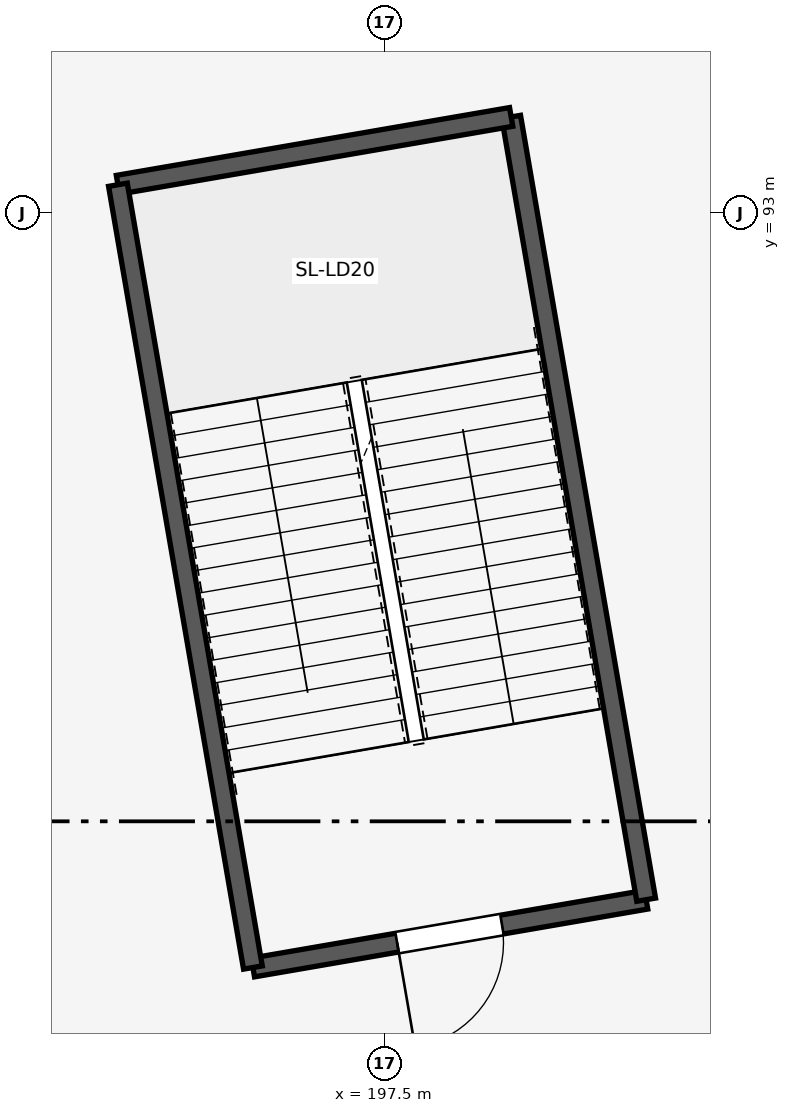
"""IFC4 building model, lengths in metres.
Left out: names, types, materials, properties, quantities, classifications, styles, units other than length and angle.
Written with IfcOpenShell. Run it as: python <this file> out.ifc"""

import sys

from ifc_helpers import new_model, si_unit, direction, frame, frame_2d, origin, place, context, subcontext, project, spatial, rectangle, extrude, element, fill, save


model = new_model("IFC4")
c1 = context("Model", 3, precision=1e-05, world=origin(), true_north=direction((0.0, 1.0)))
c2 = subcontext(c1, "Body", "Model", "MODEL_VIEW")
j1 = project(units=[si_unit("LENGTHUNIT", "METRE"), si_unit("PLANEANGLEUNIT", "RADIAN")], contexts=[c1])
p1 = place(None, origin())
s1 = spatial("IfcSite", under=j1, at=p1, CompositionType="ELEMENT")
p2 = place(p1, origin())
s2 = spatial("IfcBuilding", under=s1, at=p2, CompositionType="ELEMENT")
p3 = place(p2, origin())
s3 = spatial("IfcBuildingStorey", under=s2, at=p3, CompositionType="ELEMENT", Elevation=0.0)
p4 = place(p3, frame((195.762, 83.077, 0.0), z_axis=(0.0, 0.0, 1.0), x_axis=(0.985457162135, 0.16992404655, 0.0)))
e1 = element("IfcWall", 1, at=p4, inside=s3, PredefinedType="SHEAR", context=c2, shape_type="SweptSolid", body=[
    extrude(rectangle(XDim=5.25, YDim=0.25, at=frame_2d((2.625, 0.0))), origin(), (0.0, 0.0, 1.0), 4.94),
])
p5 = place(p4, frame((1.925, 0.0, 0.0)))
e2 = element("IfcOpeningElement", 2, at=p5, cuts=e1, PredefinedType="OPENING", context=c2, shape_type="SweptSolid", body=[
    extrude(rectangle(XDim=1.4, YDim=2.2, at=frame_2d((0.7, 1.1))), frame((0.0, 0.135, 0.0), z_axis=(0.0, -1.0, 0.0), x_axis=(1.0, 0.0, 0.0)), (0.0, 0.0, 1.0), 0.27),
])
p6 = place(p3, frame((200.936, 83.969, 0.0), z_axis=(0.0, 0.0, 1.0), x_axis=(-0.169938992676, 0.985454584833, 0.0)))
e3 = element("IfcWall", 3, at=p6, inside=s3, PredefinedType="SHEAR", context=c2, shape_type="SweptSolid", body=[
    extrude(rectangle(XDim=10.45, YDim=0.25, at=frame_2d((5.225, 0.0))), origin(), (0.0, 0.0, 1.0), 4.94),
])
p7 = place(p3, frame((199.16, 94.267, 0.0), z_axis=(0.0, 0.0, 1.0), x_axis=(-0.985457162135, -0.16992404655, 0.0)))
e4 = element("IfcWall", 4, at=p7, inside=s3, PredefinedType="SHEAR", context=c2, shape_type="SweptSolid", body=[
    extrude(rectangle(XDim=5.25, YDim=0.25, at=frame_2d((2.625, 0.0))), origin(), (0.0, 0.0, 1.0), 4.94),
])
p8 = place(p3, frame((193.987, 93.375, 0.0), z_axis=(0.0, 0.0, 1.0), x_axis=(0.169938992676, -0.985454584833, 0.0)))
e5 = element("IfcWall", 5, at=p8, inside=s3, PredefinedType="SHEAR", context=c2, shape_type="SweptSolid", body=[
    extrude(rectangle(XDim=10.45, YDim=0.25, at=frame_2d((5.225, 0.0))), origin(), (0.0, 0.0, 1.0), 4.94),
])
p9 = place(p5, frame((1.4, 0.0, 0.0), z_axis=(0.0, 0.0, 1.0), x_axis=(-1.0, 0.0, 0.0)))
e6 = element("IfcDoor", 6, at=p9, inside=s3, OperationType="SINGLE_SWING_RIGHT", PredefinedType="DOOR", context=c2, shape_type="SweptSolid", body=[
    extrude(rectangle(XDim=1.4, YDim=2.2, at=frame_2d((0.7, 1.1))), frame((0.0, 0.025, 0.0), z_axis=(0.0, -1.0, 0.0), x_axis=(1.0, 0.0, 0.0)), (0.0, 0.0, 1.0), 0.05),
])
fill(e2, e6)
save(model, sys.argv[1])
